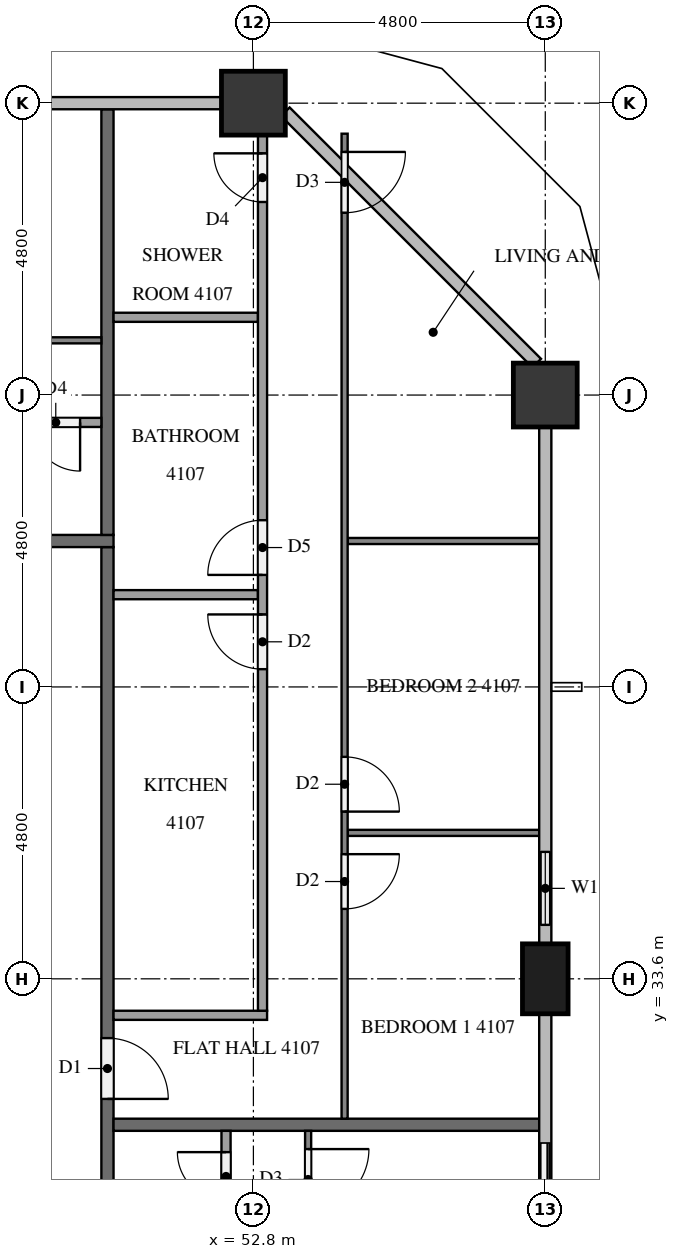
"""IFC4 building model, lengths in metres.
Left out: names, types, materials, properties, quantities, classifications, styles, units other than length and angle.
Written with IfcOpenShell. Run it as: python <this file> out.ifc"""

import sys

from ifc_helpers import new_model, si_unit, direction, frame, frame_2d, origin, origin_2d, place, context, subcontext, project, spatial, rectangle, extrude, element, fill, save


model = new_model("IFC4")
c1 = context("Model", 3, precision=1e-05, world=origin(), true_north=direction((0.0, 1.0)))
c2 = subcontext(c1, "Body", "Model", "MODEL_VIEW")
j1 = project(units=[si_unit("LENGTHUNIT", "METRE"), si_unit("PLANEANGLEUNIT", "RADIAN")], contexts=[c1])
p1 = place(None, origin())
s1 = spatial("IfcSite", under=j1, at=p1, CompositionType="ELEMENT")
p2 = place(p1, origin())
s2 = spatial("IfcBuilding", under=s1, at=p2, CompositionType="ELEMENT")
p3 = place(p2, frame((0.0, 0.0, 159.5)))
s3 = spatial("IfcBuildingStorey", under=s2, at=p3, CompositionType="ELEMENT", Elevation=159.5)
p4 = place(p3, frame((57.6, 33.6, 0.0), z_axis=(0.0, 0.0, 1.0), x_axis=(0.0, 1.0, 0.0)))
e1 = element("IfcColumn", 1, at=p4, inside=s3, PredefinedType="COLUMN", context=c2, shape_type="SweptSolid", body=[
    extrude(rectangle(XDim=1.15, YDim=0.75, at=origin_2d()), origin(), (0.0, 0.0, 1.0), 3.2),
])
for number, where, z_axis, x_axis in (
    (2, (57.6, 43.2, 0.0), (0.0, 0.0, 1.0), (1.0, 0.0, 0.0)),
    (3, (52.8, 48.0, 0.0), (0.0, 0.0, 1.0), (1.0, 0.0, 0.0)),
):
    element("IfcColumn", number, at=place(p3, frame(where, z_axis=z_axis, x_axis=x_axis)), inside=s3, PredefinedType="COLUMN", context=c2, shape_type="SweptSolid", body=[
        extrude(rectangle(XDim=1.05, YDim=1.05, at=origin_2d()), origin(), (0.0, 0.0, 1.0), 3.2),
    ])
p5 = place(p3, frame((57.6, 28.8, 0.0), z_axis=(0.0, 0.0, 1.0), x_axis=(0.0, 1.0, 0.0)))
e4 = element("IfcWall", 4, at=p5, inside=s3, PredefinedType="SOLIDWALL", context=c2, shape_type="SweptSolid", body=[
    extrude(rectangle(XDim=2.4, YDim=0.15, at=frame_2d((1.2, 0.0))), origin(), (0.0, 0.0, 1.0), 3.2),
])
p6 = place(p5, frame((0.3, 0.0, 0.0)))
e5 = element("IfcOpeningElement", 5, at=p6, cuts=e4, PredefinedType="OPENING", context=c2, shape_type="SweptSolid", body=[
    extrude(rectangle(XDim=1.8, YDim=2.4, at=frame_2d((0.9, 1.2))), frame((0.0, 0.085, 0.0), z_axis=(0.0, -1.0, 0.0), x_axis=(1.0, 0.0, 0.0)), (0.0, 0.0, 1.0), 0.17),
])
p7 = place(p3, frame((57.6, 34.175, 0.0), z_axis=(0.0, 0.0, 1.0), x_axis=(0.0, 1.0, 0.0)))
e6 = element("IfcWall", 6, at=p7, inside=s3, PredefinedType="SOLIDWALL", context=c2, shape_type="SweptSolid", body=[
    extrude(rectangle(XDim=1.825, YDim=0.15, at=frame_2d((0.913, 0.0))), origin(), (0.0, 0.0, 1.0), 3.2),
])
p8 = place(p7, frame((0.312, 0.0, 0.9)))
e7 = element("IfcOpeningElement", 7, at=p8, cuts=e6, PredefinedType="OPENING", context=c2, shape_type="SweptSolid", body=[
    extrude(rectangle(XDim=1.2, YDim=1.4, at=frame_2d((0.6, 0.7))), frame((0.0, 0.085, 0.0), z_axis=(0.0, -1.0, 0.0), x_axis=(1.0, 0.0, 0.0)), (0.0, 0.0, 1.0), 0.17),
])
p9 = place(p3, frame((50.4, 40.7, 0.0), z_axis=(0.0, 0.0, 1.0), x_axis=(0.0, -1.0, 0.0)))
e8 = element("IfcWall", 8, at=p9, inside=s3, PredefinedType="PARTITIONING", context=c2, shape_type="SweptSolid", body=[
    extrude(rectangle(XDim=28.6, YDim=0.2, at=frame_2d((14.3, 0.0))), origin(), (0.0, 0.0, 1.0), 3.2),
])
p10 = place(p9, frame((19.525, 0.0, 0.0)))
e9 = element("IfcOpeningElement", 9, at=p10, cuts=e8, PredefinedType="OPENING", context=c2, shape_type="SweptSolid", body=[
    extrude(rectangle(XDim=1.0, YDim=2.1, at=frame_2d((0.5, 1.05))), frame((0.0, 0.11, 0.0), z_axis=(0.0, -1.0, 0.0), x_axis=(1.0, 0.0, 0.0)), (0.0, 0.0, 1.0), 0.22),
])
p11 = place(p9, frame((17.675, 0.0, 0.0)))
e10 = element("IfcOpeningElement", 10, at=p11, cuts=e8, PredefinedType="OPENING", context=c2, shape_type="SweptSolid", body=[
    extrude(rectangle(XDim=1.0, YDim=2.1, at=frame_2d((0.5, 1.05))), frame((0.0, 0.11, 0.0), z_axis=(0.0, -1.0, 0.0), x_axis=(1.0, 0.0, 0.0)), (0.0, 0.0, 1.0), 0.22),
])
p12 = place(p9, frame((8.075, 0.0, 0.0)))
e11 = element("IfcOpeningElement", 11, at=p12, cuts=e8, PredefinedType="OPENING", context=c2, shape_type="SweptSolid", body=[
    extrude(rectangle(XDim=1.0, YDim=2.1, at=frame_2d((0.5, 1.05))), frame((0.0, 0.11, 0.0), z_axis=(0.0, -1.0, 0.0), x_axis=(1.0, 0.0, 0.0)), (0.0, 0.0, 1.0), 0.22),
])
p13 = place(p3, frame((11.9, 40.8, 0.0), z_axis=(0.0, 0.0, 1.0), x_axis=(1.0, 0.0, 0.0)))
e12 = element("IfcWall", 12, at=p13, inside=s3, PredefinedType="PARTITIONING", context=c2, shape_type="SweptSolid", body=[
    extrude(rectangle(XDim=38.6, YDim=0.2, at=frame_2d((19.3, 0.0))), origin(), (0.0, 0.0, 1.0), 3.2),
])
p14 = place(p13, frame((31.725, 0.0, 0.0)))
e13 = element("IfcOpeningElement", 13, at=p14, cuts=e12, PredefinedType="OPENING", context=c2, shape_type="SweptSolid", body=[
    extrude(rectangle(XDim=1.0, YDim=2.1, at=frame_2d((0.5, 1.05))), frame((0.0, 0.11, 0.0), z_axis=(0.0, -1.0, 0.0), x_axis=(1.0, 0.0, 0.0)), (0.0, 0.0, 1.0), 0.22),
])
p15 = place(p13, frame((17.325, 0.0, 0.0)))
e14 = element("IfcOpeningElement", 14, at=p15, cuts=e12, PredefinedType="OPENING", context=c2, shape_type="SweptSolid", body=[
    extrude(rectangle(XDim=1.0, YDim=2.1, at=frame_2d((0.5, 1.05))), frame((0.0, 0.11, 0.0), z_axis=(0.0, -1.0, 0.0), x_axis=(1.0, 0.0, 0.0)), (0.0, 0.0, 1.0), 0.22),
])
p16 = place(p13, frame((0.525, 0.0, 0.0)))
e15 = element("IfcOpeningElement", 15, at=p16, cuts=e12, PredefinedType="OPENING", context=c2, shape_type="SweptSolid", body=[
    extrude(rectangle(XDim=1.0, YDim=2.1, at=frame_2d((0.5, 1.05))), frame((0.0, 0.11, 0.0), z_axis=(0.0, -1.0, 0.0), x_axis=(1.0, 0.0, 0.0)), (0.0, 0.0, 1.0), 0.22),
])
for number, where, z_axis, x_axis in (
    (16, (50.5, 31.2, 0.0), (0.0, 0.0, 1.0), (1.0, 0.0, 0.0)),
    (17, (50.4, 40.9, 0.0), (0.0, 0.0, 1.0), (0.0, 1.0, 0.0)),
):
    element("IfcWall", number, at=place(p3, frame(where, z_axis=z_axis, x_axis=x_axis)), inside=s3, PredefinedType="PARTITIONING", context=c2, shape_type="SweptSolid", body=[
        extrude(rectangle(XDim=7.0, YDim=0.2, at=frame_2d((3.5, 0.0))), origin(), (0.0, 0.0, 1.0), 3.2),
    ])
p17 = place(p3, frame((53.7, 31.1, 0.0), z_axis=(0.0, 0.0, 1.0), x_axis=(0.0, -1.0, 0.0)))
e18 = element("IfcWall", 18, at=p17, inside=s3, PredefinedType="PARTITIONING", context=c2, shape_type="SweptSolid", body=[
    extrude(rectangle(XDim=9.4, YDim=0.1, at=frame_2d((4.7, 0.0))), origin(), (0.0, 0.0, 1.0), 3.2),
])
p18 = place(p17, frame((8.2, 0.0, 0.0)))
e19 = element("IfcOpeningElement", 19, at=p18, cuts=e18, PredefinedType="OPENING", context=c2, shape_type="SweptSolid", body=[
    extrude(rectangle(XDim=0.9, YDim=2.1, at=frame_2d((0.45, 1.05))), frame((0.0, 0.06, 0.0), z_axis=(0.0, -1.0, 0.0), x_axis=(1.0, 0.0, 0.0)), (0.0, 0.0, 1.0), 0.12),
])
p19 = place(p17, frame((0.3, 0.0, 0.0)))
e20 = element("IfcOpeningElement", 20, at=p19, cuts=e18, PredefinedType="OPENING", context=c2, shape_type="SweptSolid", body=[
    extrude(rectangle(XDim=1.0, YDim=2.1, at=frame_2d((0.5, 1.05))), frame((0.0, 0.06, 0.0), z_axis=(0.0, -1.0, 0.0), x_axis=(1.0, 0.0, 0.0)), (0.0, 0.0, 1.0), 0.12),
])
p20 = place(p3, frame((52.35, 23.475, 0.0), z_axis=(0.0, 0.0, 1.0), x_axis=(0.0, 1.0, 0.0)))
e21 = element("IfcWall", 21, at=p20, inside=s3, PredefinedType="PARTITIONING", context=c2, shape_type="SweptSolid", body=[
    extrude(rectangle(XDim=7.625, YDim=0.15, at=frame_2d((3.812, 0.0))), origin(), (0.0, 0.0, 1.0), 3.2),
])
p21 = place(p20, frame((0.3, 0.0, 0.0)))
e22 = element("IfcOpeningElement", 22, at=p21, cuts=e21, PredefinedType="OPENING", context=c2, shape_type="SweptSolid", body=[
    extrude(rectangle(XDim=0.9, YDim=2.1, at=frame_2d((0.45, 1.05))), frame((0.0, 0.085, 0.0), z_axis=(0.0, -1.0, 0.0), x_axis=(1.0, 0.0, 0.0)), (0.0, 0.0, 1.0), 0.17),
])
p22 = place(p20, frame((6.475, 0.0, 0.0)))
e23 = element("IfcOpeningElement", 23, at=p22, cuts=e21, PredefinedType="OPENING", context=c2, shape_type="SweptSolid", body=[
    extrude(rectangle(XDim=0.8, YDim=2.1, at=frame_2d((0.4, 1.05))), frame((0.0, 0.085, 0.0), z_axis=(0.0, -1.0, 0.0), x_axis=(1.0, 0.0, 0.0)), (0.0, 0.0, 1.0), 0.17),
])
for number, where, z_axis, x_axis in (
    (24, (54.35, 36.0, 0.0), (0.0, 0.0, 1.0), (1.0, 0.0, 0.0)),
    (25, (54.35, 40.8, 0.0), (0.0, 0.0, 1.0), (1.0, 0.0, 0.0)),
):
    element("IfcWall", number, at=place(p3, frame(where, z_axis=z_axis, x_axis=x_axis)), inside=s3, PredefinedType="PARTITIONING", context=c2, shape_type="SweptSolid", body=[
        extrude(rectangle(XDim=3.15, YDim=0.1, at=frame_2d((1.575, 0.0))), origin(), (0.0, 0.0, 1.0), 3.2),
    ])
p23 = place(p3, frame((54.3, 47.498, 0.0), z_axis=(0.0, 0.0, 1.0), x_axis=(0.0, -1.0, 0.0)))
e26 = element("IfcWall", 26, at=p23, inside=s3, PredefinedType="PARTITIONING", context=c2, shape_type="SweptSolid", body=[
    extrude(rectangle(XDim=16.198, YDim=0.1, at=frame_2d((8.099, 0.0))), origin(), (0.0, 0.0, 1.0), 3.2),
])
p24 = place(p23, frame((11.848, 0.0, 0.0)))
e27 = element("IfcOpeningElement", 27, at=p24, cuts=e26, PredefinedType="OPENING", context=c2, shape_type="SweptSolid", body=[
    extrude(rectangle(XDim=0.9, YDim=2.1, at=frame_2d((0.45, 1.05))), frame((0.0, 0.06, 0.0), z_axis=(0.0, -1.0, 0.0), x_axis=(1.0, 0.0, 0.0)), (0.0, 0.0, 1.0), 0.12),
])
p25 = place(p23, frame((10.248, 0.0, 0.0)))
e28 = element("IfcOpeningElement", 28, at=p25, cuts=e26, PredefinedType="OPENING", context=c2, shape_type="SweptSolid", body=[
    extrude(rectangle(XDim=0.9, YDim=2.1, at=frame_2d((0.45, 1.05))), frame((0.0, 0.06, 0.0), z_axis=(0.0, -1.0, 0.0), x_axis=(1.0, 0.0, 0.0)), (0.0, 0.0, 1.0), 0.12),
])
p26 = place(p23, frame((0.3, 0.0, 0.0)))
e29 = element("IfcOpeningElement", 29, at=p26, cuts=e26, PredefinedType="OPENING", context=c2, shape_type="SweptSolid", body=[
    extrude(rectangle(XDim=1.0, YDim=2.1, at=frame_2d((0.5, 1.05))), frame((0.0, 0.06, 0.0), z_axis=(0.0, -1.0, 0.0), x_axis=(1.0, 0.0, 0.0)), (0.0, 0.0, 1.0), 0.12),
])
for number, where, z_axis, x_axis in (
    (30, (50.5, 39.917, 0.0), (0.0, 0.0, 1.0), (1.0, 0.0, 0.0)),
    (31, (50.5, 44.479, 0.0), (0.0, 0.0, 1.0), (1.0, 0.0, 0.0)),
):
    element("IfcWall", number, at=place(p3, frame(where, z_axis=z_axis, x_axis=x_axis)), inside=s3, PredefinedType="PARTITIONING", context=c2, shape_type="SweptSolid", body=[
        extrude(rectangle(XDim=2.375, YDim=0.15, at=frame_2d((1.188, 0.0))), origin(), (0.0, 0.0, 1.0), 3.2),
    ])
p27 = place(p3, frame((50.5, 33.0, 0.0), z_axis=(0.0, 0.0, 1.0), x_axis=(1.0, 0.0, 0.0)))
e32 = element("IfcWall", 32, at=p27, inside=s3, PredefinedType="PARTITIONING", context=c2, shape_type="SweptSolid", body=[
    extrude(rectangle(XDim=2.525, YDim=0.15, at=frame_2d((1.262, 0.0))), origin(), (0.0, 0.0, 1.0), 3.2),
])
p28 = place(p3, frame((52.95, 33.075, 0.0), z_axis=(0.0, 0.0, 1.0), x_axis=(0.0, 1.0, 0.0)))
e33 = element("IfcWall", 33, at=p28, inside=s3, PredefinedType="PARTITIONING", context=c2, shape_type="SweptSolid", body=[
    extrude(rectangle(XDim=14.4, YDim=0.15, at=frame_2d((7.2, 0.0))), origin(), (0.0, 0.0, 1.0), 3.2),
])
p29 = place(p28, frame((5.617, 0.0, 0.0)))
e34 = element("IfcOpeningElement", 34, at=p29, cuts=e33, PredefinedType="OPENING", context=c2, shape_type="SweptSolid", body=[
    extrude(rectangle(XDim=0.9, YDim=2.1, at=frame_2d((0.45, 1.05))), frame((0.0, 0.085, 0.0), z_axis=(0.0, -1.0, 0.0), x_axis=(1.0, 0.0, 0.0)), (0.0, 0.0, 1.0), 0.17),
])
p30 = place(p28, frame((7.167, 0.0, 0.0)))
e35 = element("IfcOpeningElement", 35, at=p30, cuts=e33, PredefinedType="OPENING", context=c2, shape_type="SweptSolid", body=[
    extrude(rectangle(XDim=0.9, YDim=2.1, at=frame_2d((0.45, 1.05))), frame((0.0, 0.085, 0.0), z_axis=(0.0, -1.0, 0.0), x_axis=(1.0, 0.0, 0.0)), (0.0, 0.0, 1.0), 0.17),
])
p31 = place(p28, frame((13.3, 0.0, 0.0)))
e36 = element("IfcOpeningElement", 36, at=p31, cuts=e33, PredefinedType="OPENING", context=c2, shape_type="SweptSolid", body=[
    extrude(rectangle(XDim=0.8, YDim=2.1, at=frame_2d((0.4, 1.05))), frame((0.0, 0.085, 0.0), z_axis=(0.0, -1.0, 0.0), x_axis=(1.0, 0.0, 0.0)), (0.0, 0.0, 1.0), 0.17),
])
p32 = place(p3, frame((43.3, 44.1, 0.0), z_axis=(0.0, 0.0, 1.0), x_axis=(1.0, 0.0, 0.0)))
e37 = element("IfcWall", 37, at=p32, inside=s3, PredefinedType="PARTITIONING", context=c2, shape_type="SweptSolid", body=[
    extrude(rectangle(XDim=7.0, YDim=0.1, at=frame_2d((3.5, 0.0))), origin(), (0.0, 0.0, 1.0), 3.2),
])
p33 = place(p32, frame((0.3, 0.0, 0.0)))
e38 = element("IfcOpeningElement", 38, at=p33, cuts=e37, PredefinedType="OPENING", context=c2, shape_type="SweptSolid", body=[
    extrude(rectangle(XDim=1.0, YDim=2.1, at=frame_2d((0.5, 1.05))), frame((0.0, 0.06, 0.0), z_axis=(0.0, -1.0, 0.0), x_axis=(1.0, 0.0, 0.0)), (0.0, 0.0, 1.0), 0.12),
])
p34 = place(p3, frame((50.3, 42.75, 0.0), z_axis=(0.0, 0.0, 1.0), x_axis=(-1.0, 0.0, 0.0)))
e39 = element("IfcWall", 39, at=p34, inside=s3, PredefinedType="PARTITIONING", context=c2, shape_type="SweptSolid", body=[
    extrude(rectangle(XDim=5.225, YDim=0.15, at=frame_2d((2.613, 0.0))), origin(), (0.0, 0.0, 1.0), 3.2),
])
p35 = place(p34, frame((4.025, 0.0, 0.0)))
e40 = element("IfcOpeningElement", 40, at=p35, cuts=e39, PredefinedType="OPENING", context=c2, shape_type="SweptSolid", body=[
    extrude(rectangle(XDim=0.9, YDim=2.1, at=frame_2d((0.45, 1.05))), frame((0.0, 0.085, 0.0), z_axis=(0.0, -1.0, 0.0), x_axis=(1.0, 0.0, 0.0)), (0.0, 0.0, 1.0), 0.17),
])
p36 = place(p34, frame((0.35, 0.0, 0.0)))
e41 = element("IfcOpeningElement", 41, at=p36, cuts=e39, PredefinedType="OPENING", context=c2, shape_type="SweptSolid", body=[
    extrude(rectangle(XDim=0.8, YDim=2.1, at=frame_2d((0.4, 1.05))), frame((0.0, 0.085, 0.0), z_axis=(0.0, -1.0, 0.0), x_axis=(1.0, 0.0, 0.0)), (0.0, 0.0, 1.0), 0.17),
])
p37 = place(p6, origin())
e42 = element("IfcDoor", 42, at=p37, inside=s3, OperationType="SLIDING_TO_RIGHT", PredefinedType="DOOR", context=c2, shape_type="SweptSolid", body=[
    extrude(rectangle(XDim=1.8, YDim=2.4, at=frame_2d((0.9, 1.2))), frame((0.0, 0.025, 0.0), z_axis=(0.0, -1.0, 0.0), x_axis=(1.0, 0.0, 0.0)), (0.0, 0.0, 1.0), 0.05),
])
fill(e5, e42)
p38 = place(p8, origin())
e43 = element("IfcWindow", 43, at=p38, inside=s3, PartitioningType="SINGLE_PANEL", PredefinedType="WINDOW", context=c2, shape_type="SweptSolid", body=[
    extrude(rectangle(XDim=1.2, YDim=1.4, at=frame_2d((0.6, 0.7))), frame((0.0, 0.03, 0.0), z_axis=(0.0, -1.0, 0.0), x_axis=(1.0, 0.0, 0.0)), (0.0, 0.0, 1.0), 0.06),
])
fill(e7, e43)
p39 = place(p12, origin())
e44 = element("IfcDoor", 44, at=p39, inside=s3, OperationType="SINGLE_SWING_RIGHT", PredefinedType="DOOR", context=c2, shape_type="SweptSolid", body=[
    extrude(rectangle(XDim=1.0, YDim=2.1, at=frame_2d((0.5, 1.05))), frame((0.0, 0.025, 0.0), z_axis=(0.0, -1.0, 0.0), x_axis=(1.0, 0.0, 0.0)), (0.0, 0.0, 1.0), 0.05),
])
fill(e11, e44)
p40 = place(p19, origin())
e45 = element("IfcDoor", 45, at=p40, inside=s3, OperationType="SINGLE_SWING_LEFT", PredefinedType="DOOR", context=c2, shape_type="SweptSolid", body=[
    extrude(rectangle(XDim=1.0, YDim=2.1, at=frame_2d((0.5, 1.05))), frame((0.0, 0.025, 0.0), z_axis=(0.0, -1.0, 0.0), x_axis=(1.0, 0.0, 0.0)), (0.0, 0.0, 1.0), 0.05),
])
fill(e20, e45)
p41 = place(p22, origin())
e46 = element("IfcDoor", 46, at=p41, inside=s3, OperationType="SINGLE_SWING_RIGHT", PredefinedType="DOOR", context=c2, shape_type="SweptSolid", body=[
    extrude(rectangle(XDim=0.8, YDim=2.1, at=frame_2d((0.4, 1.05))), frame((0.0, 0.025, 0.0), z_axis=(0.0, -1.0, 0.0), x_axis=(1.0, 0.0, 0.0)), (0.0, 0.0, 1.0), 0.05),
])
fill(e23, e46)
p42 = place(p24, origin())
e47 = element("IfcDoor", 47, at=p42, inside=s3, OperationType="SINGLE_SWING_LEFT", PredefinedType="DOOR", context=c2, shape_type="SweptSolid", body=[
    extrude(rectangle(XDim=0.9, YDim=2.1, at=frame_2d((0.45, 1.05))), frame((0.0, 0.025, 0.0), z_axis=(0.0, -1.0, 0.0), x_axis=(1.0, 0.0, 0.0)), (0.0, 0.0, 1.0), 0.05),
])
fill(e27, e47)
p43 = place(p25, origin())
e48 = element("IfcDoor", 48, at=p43, inside=s3, OperationType="SINGLE_SWING_RIGHT", PredefinedType="DOOR", context=c2, shape_type="SweptSolid", body=[
    extrude(rectangle(XDim=0.9, YDim=2.1, at=frame_2d((0.45, 1.05))), frame((0.0, 0.025, 0.0), z_axis=(0.0, -1.0, 0.0), x_axis=(1.0, 0.0, 0.0)), (0.0, 0.0, 1.0), 0.05),
])
fill(e28, e48)
p44 = place(p26, origin())
e49 = element("IfcDoor", 49, at=p44, inside=s3, OperationType="SINGLE_SWING_LEFT", PredefinedType="DOOR", context=c2, shape_type="SweptSolid", body=[
    extrude(rectangle(XDim=1.0, YDim=2.1, at=frame_2d((0.5, 1.05))), frame((0.0, 0.025, 0.0), z_axis=(0.0, -1.0, 0.0), x_axis=(1.0, 0.0, 0.0)), (0.0, 0.0, 1.0), 0.05),
])
fill(e29, e49)
p45 = place(p29, origin())
e50 = element("IfcDoor", 50, at=p45, inside=s3, OperationType="SINGLE_SWING_RIGHT", PredefinedType="DOOR", context=c2, shape_type="SweptSolid", body=[
    extrude(rectangle(XDim=0.9, YDim=2.1, at=frame_2d((0.45, 1.05))), frame((0.0, 0.025, 0.0), z_axis=(0.0, -1.0, 0.0), x_axis=(1.0, 0.0, 0.0)), (0.0, 0.0, 1.0), 0.05),
])
fill(e34, e50)
p46 = place(p30, origin())
e51 = element("IfcDoor", 51, at=p46, inside=s3, OperationType="SINGLE_SWING_LEFT", PredefinedType="DOOR", context=c2, shape_type="SweptSolid", body=[
    extrude(rectangle(XDim=0.9, YDim=2.1, at=frame_2d((0.45, 1.05))), frame((0.0, 0.025, 0.0), z_axis=(0.0, -1.0, 0.0), x_axis=(1.0, 0.0, 0.0)), (0.0, 0.0, 1.0), 0.05),
])
fill(e35, e51)
p47 = place(p31, origin())
e52 = element("IfcDoor", 52, at=p47, inside=s3, OperationType="SINGLE_SWING_RIGHT", PredefinedType="DOOR", context=c2, shape_type="SweptSolid", body=[
    extrude(rectangle(XDim=0.8, YDim=2.1, at=frame_2d((0.4, 1.05))), frame((0.0, 0.025, 0.0), z_axis=(0.0, -1.0, 0.0), x_axis=(1.0, 0.0, 0.0)), (0.0, 0.0, 1.0), 0.05),
])
fill(e36, e52)
p48 = place(p36, origin())
e53 = element("IfcDoor", 53, at=p48, inside=s3, OperationType="SINGLE_SWING_LEFT", PredefinedType="DOOR", context=c2, shape_type="SweptSolid", body=[
    extrude(rectangle(XDim=0.8, YDim=2.1, at=frame_2d((0.4, 1.05))), frame((0.0, 0.025, 0.0), z_axis=(0.0, -1.0, 0.0), x_axis=(1.0, 0.0, 0.0)), (0.0, 0.0, 1.0), 0.05),
])
fill(e41, e53)
save(model, sys.argv[1])
